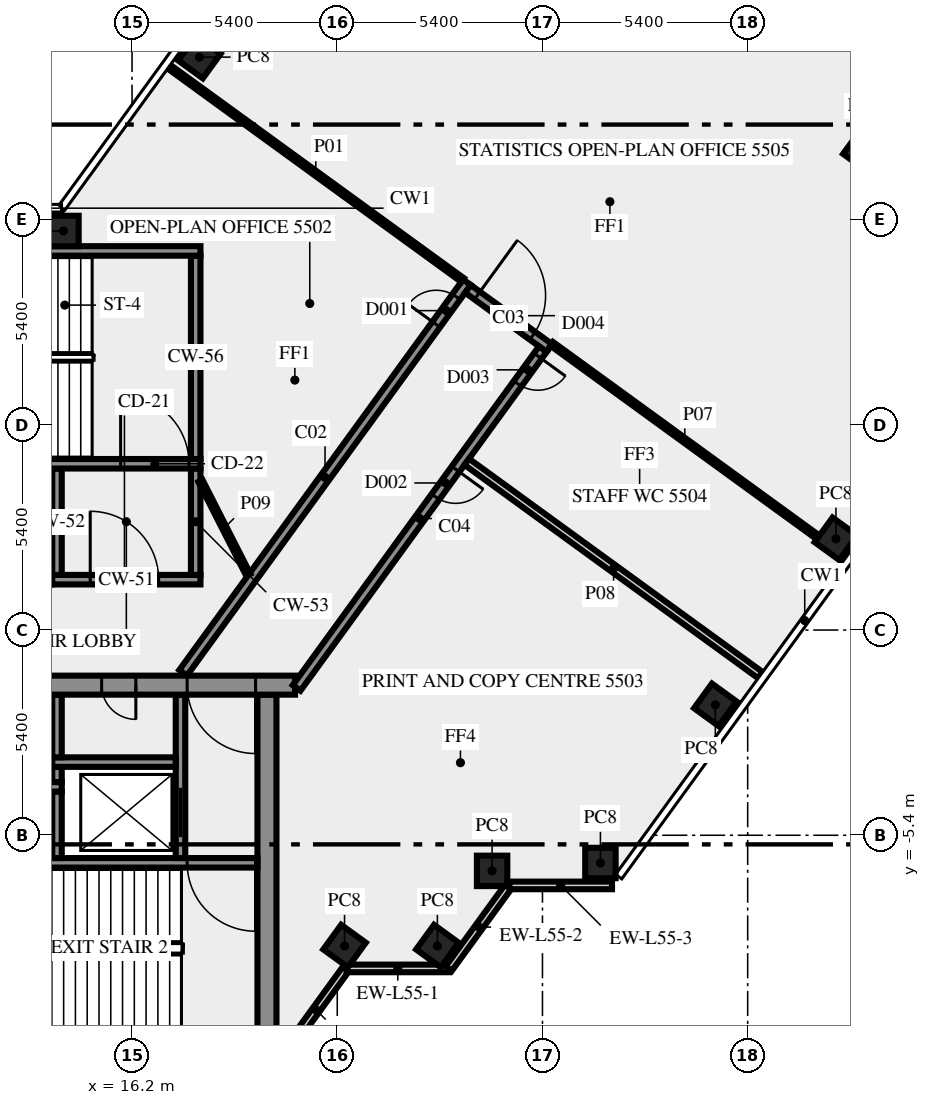
"""IFC4 building model, lengths in metres.
Left out: names, types, materials, properties, quantities, classifications, styles, units other than length and angle.
Written with IfcOpenShell. Run it as: python <this file> out.ifc"""

import sys

from ifc_helpers import new_model, si_unit, direction, frame, frame_2d, origin, origin_2d, place, context, subcontext, project, spatial, rectangle, extrude, element, fill, save


model = new_model("IFC4")
c1 = context("Model", 3, precision=1e-05, world=origin(), true_north=direction((0.0, 1.0)))
c2 = subcontext(c1, "Body", "Model", "MODEL_VIEW")
j1 = project(units=[si_unit("LENGTHUNIT", "METRE"), si_unit("PLANEANGLEUNIT", "RADIAN")], contexts=[c1])
p1 = place(None, origin())
s1 = spatial("IfcSite", under=j1, at=p1, CompositionType="ELEMENT")
p2 = place(p1, origin())
s2 = spatial("IfcBuilding", under=s1, at=p2, CompositionType="ELEMENT")
p3 = place(p2, frame((0.0, 0.0, 234.0)))
s3 = spatial("IfcBuildingStorey", under=s2, at=p3, CompositionType="ELEMENT", Elevation=234.0)
for number, where, z_axis, x_axis in (
    (1, (21.792, -8.315, 0.0), (0.0, 0.0, 1.0), (0.588, 0.809, 0.0)),
    (2, (24.235, -8.315, 0.0), (0.0, 0.0, 1.0), (0.588, 0.809, 0.0)),
    (3, (25.674, -6.337, 0.0), (0.0, 0.0, 1.0), (1.0, 0.0, 0.0)),
    (4, (28.525, -6.13, 0.0), (0.0, 0.0, 1.0), (1.0, 0.0, 0.0)),
    (5, (31.548, -1.969, 0.0), (0.0, 0.0, 1.0), (0.588, 0.809, 0.0)),
    (6, (34.722, 2.4, 0.0), (0.0, 0.0, 1.0), (0.588, 0.809, 0.0)),
    (7, (35.471, 12.616, 0.0), (0.0, 0.0, 1.0), (-0.809, 0.588, 0.0)),
    (8, (17.974, 15.075, 0.0), (0.0, 0.0, 1.0), (-0.588, -0.809, 0.0)),
    (9, (14.395, 10.5, 0.0), (0.0, 0.0, 1.0), (-1.0, 0.0, 0.0)),
):
    element("IfcColumn", number, at=place(p3, frame(where, z_axis=z_axis, x_axis=x_axis)), inside=s3, PredefinedType="COLUMN", context=c2, shape_type="SweptSolid", body=[
        extrude(rectangle(XDim=0.8, YDim=0.8, at=origin_2d()), origin(), (0.0, 0.0, 1.0), 3.65),
    ])
p4 = place(p3, frame((20.253, -11.083, 0.0), z_axis=(0.0, 0.0, 1.0), x_axis=(0.587766567315, 0.809030569476, 0.0)))
e10 = element("IfcWall", 10, at=p4, inside=s3, PredefinedType="SOLIDWALL", context=c2, shape_type="SweptSolid", body=[
    extrude(rectangle(XDim=2.688, YDim=0.2, at=frame_2d((1.344, 0.0))), origin(), (0.0, 0.0, 1.0), 3.65),
])
p5 = place(p3, frame((21.843, -8.904, 0.0), z_axis=(0.0, 0.0, 1.0), x_axis=(1.0, 0.0, 0.0)))
e11 = element("IfcWall", 11, at=p5, inside=s3, PredefinedType="SOLIDWALL", context=c2, shape_type="SweptSolid", body=[
    extrude(rectangle(XDim=2.7, YDim=0.2, at=frame_2d((1.35, 0.0))), origin(), (0.0, 0.0, 1.0), 3.65),
])
p6 = place(p3, frame((24.533, -8.909, 0.0), z_axis=(0.0, 0.0, 1.0), x_axis=(0.587720002413, 0.809064397168, 0.0)))
e12 = element("IfcWall", 12, at=p6, inside=s3, PredefinedType="SOLIDWALL", context=c2, shape_type="SweptSolid", body=[
    extrude(rectangle(XDim=2.7, YDim=0.2, at=frame_2d((1.35, 0.0))), origin(), (0.0, 0.0, 1.0), 3.65),
])
p7 = place(p3, frame((26.13, -6.719, 0.0), z_axis=(0.0, 0.0, 1.0), x_axis=(1.0, 0.0, 0.0)))
e13 = element("IfcWall", 13, at=p7, inside=s3, PredefinedType="SOLIDWALL", context=c2, shape_type="SweptSolid", body=[
    extrude(rectangle(XDim=2.7, YDim=0.2, at=frame_2d((1.35, 0.0))), origin(), (0.0, 0.0, 1.0), 3.65),
])
p8 = place(p3, frame((19.75, -10.5, 0.0), z_axis=(0.0, 0.0, 1.0), x_axis=(0.0, 1.0, 0.0)))
e14 = element("IfcWall", 14, at=p8, inside=s3, PredefinedType="SHEAR", context=c2, shape_type="SweptSolid", body=[
    extrude(rectangle(XDim=8.8, YDim=0.5, at=frame_2d((4.4, 0.0))), origin(), (0.0, 0.0, 1.0), 3.65),
])
p9 = place(p3, frame((19.5, -6.125, 0.0), z_axis=(0.0, 0.0, 1.0), x_axis=(-1.0, 0.0, 0.0)))
e15 = element("IfcWall", 15, at=p9, inside=s3, PredefinedType="SHEAR", context=c2, shape_type="SweptSolid", body=[
    extrude(rectangle(XDim=8.05, YDim=0.25, at=frame_2d((4.025, 0.0))), origin(), (0.0, 0.0, 1.0), 3.65),
])
p10 = place(p9, frame((0.05, 0.0, 0.0)))
e16 = element("IfcOpeningElement", 16, at=p10, cuts=e15, PredefinedType="OPENING", context=c2, shape_type="SweptSolid", body=[
    extrude(rectangle(XDim=1.8, YDim=2.1, at=frame_2d((0.9, 1.05))), frame((0.0, 0.135, 0.0), z_axis=(0.0, -1.0, 0.0), x_axis=(1.0, 0.0, 0.0)), (0.0, 0.0, 1.0), 0.27),
])
p11 = place(p3, frame((14.225, -6.0, 0.0), z_axis=(0.0, 0.0, 1.0), x_axis=(0.0, 1.0, 0.0)))
e17 = element("IfcWall", 17, at=p11, inside=s3, PredefinedType="SHEAR", context=c2, shape_type="SweptSolid", body=[
    extrude(rectangle(XDim=1.75, YDim=0.25, at=frame_2d((0.875, 0.0))), origin(), (0.0, 0.0, 1.0), 3.65),
])
p12 = place(p3, frame((17.475, -6.0, 0.0), z_axis=(0.0, 0.0, 1.0), x_axis=(0.0, 1.0, 0.0)))
e18 = element("IfcWall", 18, at=p12, inside=s3, PredefinedType="SHEAR", context=c2, shape_type="SweptSolid", body=[
    extrude(rectangle(XDim=4.3, YDim=0.25, at=frame_2d((2.15, 0.0))), origin(), (0.0, 0.0, 1.0), 3.65),
])
p13 = place(p12, frame((0.55, 0.0, 0.0)))
e19 = element("IfcOpeningElement", 19, at=p13, cuts=e18, PredefinedType="OPENING", context=c2, shape_type="SweptSolid", body=[
    extrude(rectangle(XDim=1.3, YDim=2.1, at=frame_2d((0.65, 1.05))), frame((0.0, 0.135, 0.0), z_axis=(0.0, -1.0, 0.0), x_axis=(1.0, 0.0, 0.0)), (0.0, 0.0, 1.0), 0.27),
])
p14 = place(p3, frame((1.45, -4.125, 0.0), z_axis=(0.0, 0.0, 1.0), x_axis=(1.0, 0.0, 0.0)))
e20 = element("IfcWall", 20, at=p14, inside=s3, PredefinedType="SHEAR", context=c2, shape_type="SweptSolid", body=[
    extrude(rectangle(XDim=12.9, YDim=0.25, at=frame_2d((6.45, 0.0))), origin(), (0.0, 0.0, 1.0), 3.65),
])
p15 = place(p14, frame((0.7, 0.0, 0.0)))
e21 = element("IfcOpeningElement", 21, at=p15, cuts=e20, PredefinedType="OPENING", context=c2, shape_type="SweptSolid", body=[
    extrude(rectangle(XDim=1.3, YDim=2.1, at=frame_2d((0.65, 1.05))), frame((0.0, 0.135, 0.0), z_axis=(0.0, -1.0, 0.0), x_axis=(1.0, 0.0, 0.0)), (0.0, 0.0, 1.0), 0.27),
])
p16 = place(p14, frame((3.3, 0.0, 0.0)))
e22 = element("IfcOpeningElement", 22, at=p16, cuts=e20, PredefinedType="OPENING", context=c2, shape_type="SweptSolid", body=[
    extrude(rectangle(XDim=1.1, YDim=2.1, at=frame_2d((0.55, 1.05))), frame((0.0, 0.135, 0.0), z_axis=(0.0, -1.0, 0.0), x_axis=(1.0, 0.0, 0.0)), (0.0, 0.0, 1.0), 0.27),
])
p17 = place(p14, frame((5.8, 0.0, 0.0)))
e23 = element("IfcOpeningElement", 23, at=p17, cuts=e20, PredefinedType="OPENING", context=c2, shape_type="SweptSolid", body=[
    extrude(rectangle(XDim=1.1, YDim=2.1, at=frame_2d((0.55, 1.05))), frame((0.0, 0.135, 0.0), z_axis=(0.0, -1.0, 0.0), x_axis=(1.0, 0.0, 0.0)), (0.0, 0.0, 1.0), 0.27),
])
p18 = place(p14, frame((8.3, 0.0, 0.0)))
e24 = element("IfcOpeningElement", 24, at=p18, cuts=e20, PredefinedType="OPENING", context=c2, shape_type="SweptSolid", body=[
    extrude(rectangle(XDim=1.1, YDim=2.1, at=frame_2d((0.55, 1.05))), frame((0.0, 0.135, 0.0), z_axis=(0.0, -1.0, 0.0), x_axis=(1.0, 0.0, 0.0)), (0.0, 0.0, 1.0), 0.27),
])
p19 = place(p3, frame((14.225, -4.0, 0.0), z_axis=(0.0, 0.0, 1.0), x_axis=(0.0, 1.0, 0.0)))
e25 = element("IfcWall", 25, at=p19, inside=s3, PredefinedType="SHEAR", context=c2, shape_type="SweptSolid", body=[
    extrude(rectangle(XDim=0.4, YDim=0.25, at=frame_2d((0.2, 0.0))), origin(), (0.0, 0.0, 1.0), 3.65),
])
p20 = place(p3, frame((14.1, -3.475, 0.0), z_axis=(0.0, 0.0, 1.0), x_axis=(1.0, 0.0, 0.0)))
e26 = element("IfcWall", 26, at=p20, inside=s3, PredefinedType="SHEAR", context=c2, shape_type="SweptSolid", body=[
    extrude(rectangle(XDim=3.25, YDim=0.25, at=frame_2d((1.625, 0.0))), origin(), (0.0, 0.0, 1.0), 3.65),
])
p21 = place(p3, frame((14.225, -3.35, 0.0), z_axis=(0.0, 0.0, 1.0), x_axis=(0.0, 1.0, 0.0)))
e27 = element("IfcWall", 27, at=p21, inside=s3, PredefinedType="SHEAR", context=c2, shape_type="SweptSolid", body=[
    extrude(rectangle(XDim=1.65, YDim=0.25, at=frame_2d((0.825, 0.0))), origin(), (0.0, 0.0, 1.0), 3.65),
])
p22 = place(p3, frame((20.49, -1.45, 0.0), z_axis=(0.0, 0.0, 1.0), x_axis=(-1.0, 0.0, 0.0)))
e28 = element("IfcWall", 28, at=p22, inside=s3, PredefinedType="SHEAR", context=c2, shape_type="SweptSolid", body=[
    extrude(rectangle(XDim=40.98, YDim=0.5, at=frame_2d((20.49, 0.0))), origin(), (0.0, 0.0, 1.0), 3.65),
])
p23 = place(p22, frame((38.14, 0.0, 0.0)))
e29 = element("IfcOpeningElement", 29, at=p23, cuts=e28, PredefinedType="OPENING", context=c2, shape_type="SweptSolid", body=[
    extrude(rectangle(XDim=1.8, YDim=2.1, at=frame_2d((0.9, 1.05))), frame((0.0, 0.26, 0.0), z_axis=(0.0, -1.0, 0.0), x_axis=(1.0, 0.0, 0.0)), (0.0, 0.0, 1.0), 0.52),
])
p24 = place(p22, frame((36.728, 0.0, 0.0)))
e30 = element("IfcOpeningElement", 30, at=p24, cuts=e28, PredefinedType="OPENING", context=c2, shape_type="SweptSolid", body=[
    extrude(rectangle(XDim=0.8, YDim=2.1, at=frame_2d((0.4, 1.05))), frame((0.0, 0.26, 0.0), z_axis=(0.0, -1.0, 0.0), x_axis=(1.0, 0.0, 0.0)), (0.0, 0.0, 1.0), 0.52),
])
p25 = place(p22, frame((35.153, 0.0, 0.0)))
e31 = element("IfcOpeningElement", 31, at=p25, cuts=e28, PredefinedType="OPENING", context=c2, shape_type="SweptSolid", body=[
    extrude(rectangle(XDim=0.8, YDim=2.1, at=frame_2d((0.4, 1.05))), frame((0.0, 0.26, 0.0), z_axis=(0.0, -1.0, 0.0), x_axis=(1.0, 0.0, 0.0)), (0.0, 0.0, 1.0), 0.52),
])
p26 = place(p22, frame((32.94, 0.0, 0.0)))
e32 = element("IfcOpeningElement", 32, at=p26, cuts=e28, PredefinedType="OPENING", context=c2, shape_type="SweptSolid", body=[
    extrude(rectangle(XDim=0.9, YDim=2.1, at=frame_2d((0.45, 1.05))), frame((0.0, 0.26, 0.0), z_axis=(0.0, -1.0, 0.0), x_axis=(1.0, 0.0, 0.0)), (0.0, 0.0, 1.0), 0.52),
])
p27 = place(p22, frame((29.603, 0.0, 0.0)))
e33 = element("IfcOpeningElement", 33, at=p27, cuts=e28, PredefinedType="OPENING", context=c2, shape_type="SweptSolid", body=[
    extrude(rectangle(XDim=0.9, YDim=2.1, at=frame_2d((0.45, 1.05))), frame((0.0, 0.26, 0.0), z_axis=(0.0, -1.0, 0.0), x_axis=(1.0, 0.0, 0.0)), (0.0, 0.0, 1.0), 0.52),
])
p28 = place(p22, frame((25.877, 0.0, 0.0)))
e34 = element("IfcOpeningElement", 34, at=p28, cuts=e28, PredefinedType="OPENING", context=c2, shape_type="SweptSolid", body=[
    extrude(rectangle(XDim=0.9, YDim=2.1, at=frame_2d((0.45, 1.05))), frame((0.0, 0.26, 0.0), z_axis=(0.0, -1.0, 0.0), x_axis=(1.0, 0.0, 0.0)), (0.0, 0.0, 1.0), 0.52),
])
p29 = place(p22, frame((19.59, 0.0, 0.0)))
e35 = element("IfcOpeningElement", 35, at=p29, cuts=e28, PredefinedType="OPENING", context=c2, shape_type="SweptSolid", body=[
    extrude(rectangle(XDim=2.0, YDim=2.1, at=frame_2d((1.0, 1.05))), frame((0.0, 0.26, 0.0), z_axis=(0.0, -1.0, 0.0), x_axis=(1.0, 0.0, 0.0)), (0.0, 0.0, 1.0), 0.52),
])
p30 = place(p22, frame((7.14, 0.0, 0.0)))
e36 = element("IfcOpeningElement", 36, at=p30, cuts=e28, PredefinedType="OPENING", context=c2, shape_type="SweptSolid", body=[
    extrude(rectangle(XDim=0.9, YDim=2.1, at=frame_2d((0.45, 1.05))), frame((0.0, 0.26, 0.0), z_axis=(0.0, -1.0, 0.0), x_axis=(1.0, 0.0, 0.0)), (0.0, 0.0, 1.0), 0.52),
])
p31 = place(p22, frame((4.19, 0.0, 0.0)))
e37 = element("IfcOpeningElement", 37, at=p31, cuts=e28, PredefinedType="OPENING", context=c2, shape_type="SweptSolid", body=[
    extrude(rectangle(XDim=0.9, YDim=2.1, at=frame_2d((0.45, 1.05))), frame((0.0, 0.26, 0.0), z_axis=(0.0, -1.0, 0.0), x_axis=(1.0, 0.0, 0.0)), (0.0, 0.0, 1.0), 0.52),
])
p32 = place(p22, frame((1.04, 0.0, 0.0)))
e38 = element("IfcOpeningElement", 38, at=p32, cuts=e28, PredefinedType="OPENING", context=c2, shape_type="SweptSolid", body=[
    extrude(rectangle(XDim=1.8, YDim=2.1, at=frame_2d((0.9, 1.05))), frame((0.0, 0.26, 0.0), z_axis=(0.0, -1.0, 0.0), x_axis=(1.0, 0.0, 0.0)), (0.0, 0.0, 1.0), 0.52),
])
p33 = place(p3, frame((14.1, 1.325, 0.0), z_axis=(0.0, 0.0, 1.0), x_axis=(1.0, 0.0, 0.0)))
e39 = element("IfcWall", 39, at=p33, inside=s3, PredefinedType="SHEAR", context=c2, shape_type="SweptSolid", body=[
    extrude(rectangle(XDim=3.9, YDim=0.25, at=frame_2d((1.95, 0.0))), origin(), (0.0, 0.0, 1.0), 3.65),
])
p34 = place(p33, frame((1.0, 0.0, 0.0)))
e40 = element("IfcOpeningElement", 40, at=p34, cuts=e39, PredefinedType="OPENING", context=c2, shape_type="SweptSolid", body=[
    extrude(rectangle(XDim=1.8, YDim=2.1, at=frame_2d((0.9, 1.05))), frame((0.0, 0.135, 0.0), z_axis=(0.0, -1.0, 0.0), x_axis=(1.0, 0.0, 0.0)), (0.0, 0.0, 1.0), 0.27),
])
for number, where, z_axis, x_axis in (
    (41, (14.225, 1.45, 0.0), (0.0, 0.0, 1.0), (0.0, 1.0, 0.0)),
    (42, (17.875, 1.45, 0.0), (0.0, 0.0, 1.0), (0.0, 1.0, 0.0)),
):
    element("IfcWall", number, at=place(p3, frame(where, z_axis=z_axis, x_axis=x_axis)), inside=s3, PredefinedType="SHEAR", context=c2, shape_type="SweptSolid", body=[
        extrude(rectangle(XDim=2.8, YDim=0.25, at=frame_2d((1.4, 0.0))), origin(), (0.0, 0.0, 1.0), 3.65),
    ])
p35 = place(p3, frame((7.5, 4.375, 0.0), z_axis=(0.0, 0.0, 1.0), x_axis=(1.0, 0.0, 0.0)))
e43 = element("IfcWall", 43, at=p35, inside=s3, PredefinedType="SHEAR", context=c2, shape_type="SweptSolid", body=[
    extrude(rectangle(XDim=10.5, YDim=0.25, at=frame_2d((5.25, 0.0))), origin(), (0.0, 0.0, 1.0), 3.65),
])
p36 = place(p35, frame((8.4, 0.0, 0.0)))
e44 = element("IfcOpeningElement", 44, at=p36, cuts=e43, PredefinedType="OPENING", context=c2, shape_type="SweptSolid", body=[
    extrude(rectangle(XDim=1.8, YDim=2.1, at=frame_2d((0.9, 1.05))), frame((0.0, 0.135, 0.0), z_axis=(0.0, -1.0, 0.0), x_axis=(1.0, 0.0, 0.0)), (0.0, 0.0, 1.0), 0.27),
])
p37 = place(p3, frame((17.875, 4.5, 0.0), z_axis=(0.0, 0.0, 1.0), x_axis=(0.0, 1.0, 0.0)))
e45 = element("IfcWall", 45, at=p37, inside=s3, PredefinedType="SHEAR", context=c2, shape_type="SweptSolid", body=[
    extrude(rectangle(XDim=5.35, YDim=0.25, at=frame_2d((2.675, 0.0))), origin(), (0.0, 0.0, 1.0), 3.65),
])
p38 = place(p3, frame((7.5, 9.975, 0.0), z_axis=(0.0, 0.0, 1.0), x_axis=(1.0, 0.0, 0.0)))
e46 = element("IfcWall", 46, at=p38, inside=s3, PredefinedType="SHEAR", context=c2, shape_type="SweptSolid", body=[
    extrude(rectangle(XDim=10.5, YDim=0.25, at=frame_2d((5.25, 0.0))), origin(), (0.0, 0.0, 1.0), 3.65),
])
p39 = place(p38, frame((2.0, 0.0, 1.0)))
e47 = element("IfcOpeningElement", 47, at=p39, cuts=e46, PredefinedType="OPENING", context=c2, shape_type="SweptSolid", body=[
    extrude(rectangle(XDim=1.2, YDim=1.2, at=frame_2d((0.6, 0.6))), frame((0.0, 0.135, 0.0), z_axis=(0.0, -1.0, 0.0), x_axis=(1.0, 0.0, 0.0)), (0.0, 0.0, 1.0), 0.27),
])
p40 = place(p3, frame((17.545, -1.125, 0.0), z_axis=(0.0, 0.0, 1.0), x_axis=(0.587796810203, 0.809008596935, 0.0)))
e48 = element("IfcWall", 48, at=p40, inside=s3, PredefinedType="SOLIDWALL", context=c2, shape_type="SweptSolid", body=[
    extrude(rectangle(XDim=12.703, YDim=0.25, at=frame_2d((6.352, 0.0))), origin(), (0.0, 0.0, 1.0), 3.65),
])
p41 = place(p40, frame((11.329, 0.0, 0.0)))
e49 = element("IfcOpeningElement", 49, at=p41, cuts=e48, PredefinedType="OPENING", context=c2, shape_type="SweptSolid", body=[
    extrude(rectangle(XDim=0.9, YDim=2.1, at=frame_2d((0.45, 1.05))), frame((0.0, 0.135, 0.0), z_axis=(0.0, -1.0, 0.0), x_axis=(1.0, 0.0, 0.0)), (0.0, 0.0, 1.0), 0.27),
])
p42 = place(p3, frame((25.039, 8.978, 0.0), z_axis=(0.0, 0.0, 1.0), x_axis=(0.809006914995, -0.587799125119, 0.0)))
e50 = element("IfcWall", 50, at=p42, inside=s3, PredefinedType="SOLIDWALL", context=c2, shape_type="SweptSolid", body=[
    extrude(rectangle(XDim=2.65, YDim=0.25, at=frame_2d((1.325, 0.0))), origin(), (0.0, 0.0, 1.0), 3.65),
])
p43 = place(p42, frame((0.301, 0.0, 0.0)))
e51 = element("IfcOpeningElement", 51, at=p43, cuts=e50, PredefinedType="OPENING", context=c2, shape_type="SweptSolid", body=[
    extrude(rectangle(XDim=1.8, YDim=2.1, at=frame_2d((0.9, 1.05))), frame((0.0, 0.135, 0.0), z_axis=(0.0, -1.0, 0.0), x_axis=(1.0, 0.0, 0.0)), (0.0, 0.0, 1.0), 0.27),
])
p44 = place(p3, frame((27.009, 7.392, 0.0), z_axis=(0.0, 0.0, 1.0), x_axis=(-0.587776457057, -0.809023384414, 0.0)))
e52 = element("IfcWall", 52, at=p44, inside=s3, PredefinedType="SOLIDWALL", context=c2, shape_type="SweptSolid", body=[
    extrude(rectangle(XDim=11.021, YDim=0.25, at=frame_2d((5.51, 0.0))), origin(), (0.0, 0.0, 1.0), 3.65),
])
p45 = place(p44, frame((3.905, 0.0, 0.0)))
e53 = element("IfcOpeningElement", 53, at=p45, cuts=e52, PredefinedType="OPENING", context=c2, shape_type="SweptSolid", body=[
    extrude(rectangle(XDim=0.9, YDim=2.1, at=frame_2d((0.45, 1.05))), frame((0.0, 0.135, 0.0), z_axis=(0.0, -1.0, 0.0), x_axis=(1.0, 0.0, 0.0)), (0.0, 0.0, 1.0), 0.27),
])
p46 = place(p44, frame((0.225, 0.0, 0.0)))
e54 = element("IfcOpeningElement", 54, at=p46, cuts=e52, PredefinedType="OPENING", context=c2, shape_type="SweptSolid", body=[
    extrude(rectangle(XDim=0.9, YDim=2.1, at=frame_2d((0.45, 1.05))), frame((0.0, 0.135, 0.0), z_axis=(0.0, -1.0, 0.0), x_axis=(1.0, 0.0, 0.0)), (0.0, 0.0, 1.0), 0.27),
])
p47 = place(p3, frame((24.898, 9.209, 0.0), z_axis=(0.0, 0.0, 1.0), x_axis=(-0.809013490065, 0.587790075531, 0.0)))
e55 = element("IfcWall", 55, at=p47, inside=s3, PredefinedType="PARTITIONING", context=c2, shape_type="SweptSolid", body=[
    extrude(rectangle(XDim=9.549, YDim=0.12, at=frame_2d((4.775, 0.0))), origin(), (0.0, 0.0, 1.0), 2.85),
])
p48 = place(p3, frame((27.24, 7.532, 0.0), z_axis=(0.0, 0.0, 1.0), x_axis=(0.809033281668, -0.587762834103, 0.0)))
e56 = element("IfcWall", 56, at=p48, inside=s3, PredefinedType="PARTITIONING", context=c2, shape_type="SweptSolid", body=[
    extrude(rectangle(XDim=8.665, YDim=0.12, at=frame_2d((4.333, 0.0))), origin(), (0.0, 0.0, 1.0), 3.65),
])
p49 = place(p3, frame((32.734, -1.187, 0.0), z_axis=(0.0, 0.0, 1.0), x_axis=(-0.808994684961, 0.587815957341, 0.0)))
e57 = element("IfcWall", 57, at=p49, inside=s3, PredefinedType="SOLIDWALL", context=c2, shape_type="SweptSolid", body=[
    extrude(rectangle(XDim=9.55, YDim=0.2, at=frame_2d((4.775, 0.0))), origin(), (0.0, 0.0, 1.0), 2.85),
])
p50 = place(p3, frame((18.0, 3.925, 0.0), z_axis=(0.0, 0.0, 1.0), x_axis=(0.453950796792, -0.891026752736, 0.0)))
e58 = element("IfcWall", 58, at=p50, inside=s3, PredefinedType="PARTITIONING", context=c2, shape_type="SweptSolid", body=[
    extrude(rectangle(XDim=2.778, YDim=0.12, at=frame_2d((1.389, 0.0))), origin(), (0.0, 0.0, 1.0), 3.65),
])
p51 = place(p10, origin())
e59 = element("IfcDoor", 59, at=p51, inside=s3, OperationType="DOUBLE_DOOR_SINGLE_SWING", PredefinedType="DOOR", context=c2, shape_type="SweptSolid", body=[
    extrude(rectangle(XDim=1.8, YDim=2.1, at=frame_2d((0.9, 1.05))), frame((0.0, 0.025, 0.0), z_axis=(0.0, -1.0, 0.0), x_axis=(1.0, 0.0, 0.0)), (0.0, 0.0, 1.0), 0.05),
])
fill(e16, e59)
p52 = place(p13, origin())
e60 = element("IfcDoor", 60, at=p52, inside=s3, OperationType="DOUBLE_DOOR_SLIDING", PredefinedType="DOOR", context=c2, shape_type="SweptSolid", body=[
    extrude(rectangle(XDim=1.3, YDim=2.1, at=frame_2d((0.65, 1.05))), frame((0.0, 0.025, 0.0), z_axis=(0.0, -1.0, 0.0), x_axis=(1.0, 0.0, 0.0)), (0.0, 0.0, 1.0), 0.05),
])
fill(e19, e60)
p53 = place(p31, origin())
e61 = element("IfcDoor", 61, at=p53, inside=s3, OperationType="SINGLE_SWING_LEFT", PredefinedType="DOOR", context=c2, shape_type="SweptSolid", body=[
    extrude(rectangle(XDim=0.9, YDim=2.1, at=frame_2d((0.45, 1.05))), frame((0.0, 0.025, 0.0), z_axis=(0.0, -1.0, 0.0), x_axis=(1.0, 0.0, 0.0)), (0.0, 0.0, 1.0), 0.05),
])
fill(e37, e61)
p54 = place(p32, origin())
e62 = element("IfcDoor", 62, at=p54, inside=s3, OperationType="DOUBLE_DOOR_SINGLE_SWING", PredefinedType="DOOR", context=c2, shape_type="SweptSolid", body=[
    extrude(rectangle(XDim=1.8, YDim=2.1, at=frame_2d((0.9, 1.05))), frame((0.0, 0.025, 0.0), z_axis=(0.0, -1.0, 0.0), x_axis=(1.0, 0.0, 0.0)), (0.0, 0.0, 1.0), 0.05),
])
fill(e38, e62)
p55 = place(p34, origin())
e63 = element("IfcDoor", 63, at=p55, inside=s3, OperationType="DOUBLE_DOOR_SINGLE_SWING", PredefinedType="DOOR", context=c2, shape_type="SweptSolid", body=[
    extrude(rectangle(XDim=1.8, YDim=2.1, at=frame_2d((0.9, 1.05))), frame((0.0, 0.025, 0.0), z_axis=(0.0, -1.0, 0.0), x_axis=(1.0, 0.0, 0.0)), (0.0, 0.0, 1.0), 0.05),
])
fill(e40, e63)
p56 = place(p36, origin())
e64 = element("IfcDoor", 64, at=p56, inside=s3, OperationType="DOUBLE_DOOR_SINGLE_SWING", PredefinedType="DOOR", context=c2, shape_type="SweptSolid", body=[
    extrude(rectangle(XDim=1.8, YDim=2.1, at=frame_2d((0.9, 1.05))), frame((0.0, 0.025, 0.0), z_axis=(0.0, -1.0, 0.0), x_axis=(1.0, 0.0, 0.0)), (0.0, 0.0, 1.0), 0.05),
])
fill(e44, e64)
p57 = place(p41, origin())
e65 = element("IfcDoor", 65, at=p57, inside=s3, OperationType="SINGLE_SWING_RIGHT", PredefinedType="DOOR", context=c2, shape_type="SweptSolid", body=[
    extrude(rectangle(XDim=0.9, YDim=2.1, at=frame_2d((0.45, 1.05))), frame((0.0, 0.025, 0.0), z_axis=(0.0, -1.0, 0.0), x_axis=(1.0, 0.0, 0.0)), (0.0, 0.0, 1.0), 0.05),
])
fill(e49, e65)
p58 = place(p43, origin())
e66 = element("IfcDoor", 66, at=p58, inside=s3, OperationType="DOUBLE_DOOR_SINGLE_SWING", PredefinedType="DOOR", context=c2, shape_type="SweptSolid", body=[
    extrude(rectangle(XDim=1.8, YDim=2.1, at=frame_2d((0.9, 1.05))), frame((0.0, 0.025, 0.0), z_axis=(0.0, -1.0, 0.0), x_axis=(1.0, 0.0, 0.0)), (0.0, 0.0, 1.0), 0.05),
])
fill(e51, e66)
p59 = place(p45, origin())
e67 = element("IfcDoor", 67, at=p59, inside=s3, OperationType="SINGLE_SWING_LEFT", PredefinedType="DOOR", context=c2, shape_type="SweptSolid", body=[
    extrude(rectangle(XDim=0.9, YDim=2.1, at=frame_2d((0.45, 1.05))), frame((0.0, 0.025, 0.0), z_axis=(0.0, -1.0, 0.0), x_axis=(1.0, 0.0, 0.0)), (0.0, 0.0, 1.0), 0.05),
])
fill(e53, e67)
p60 = place(p46, origin())
e68 = element("IfcDoor", 68, at=p60, inside=s3, OperationType="SINGLE_SWING_LEFT", PredefinedType="DOOR", context=c2, shape_type="SweptSolid", body=[
    extrude(rectangle(XDim=0.9, YDim=2.1, at=frame_2d((0.45, 1.05))), frame((0.0, 0.025, 0.0), z_axis=(0.0, -1.0, 0.0), x_axis=(1.0, 0.0, 0.0)), (0.0, 0.0, 1.0), 0.05),
])
fill(e54, e68)
save(model, sys.argv[1])
